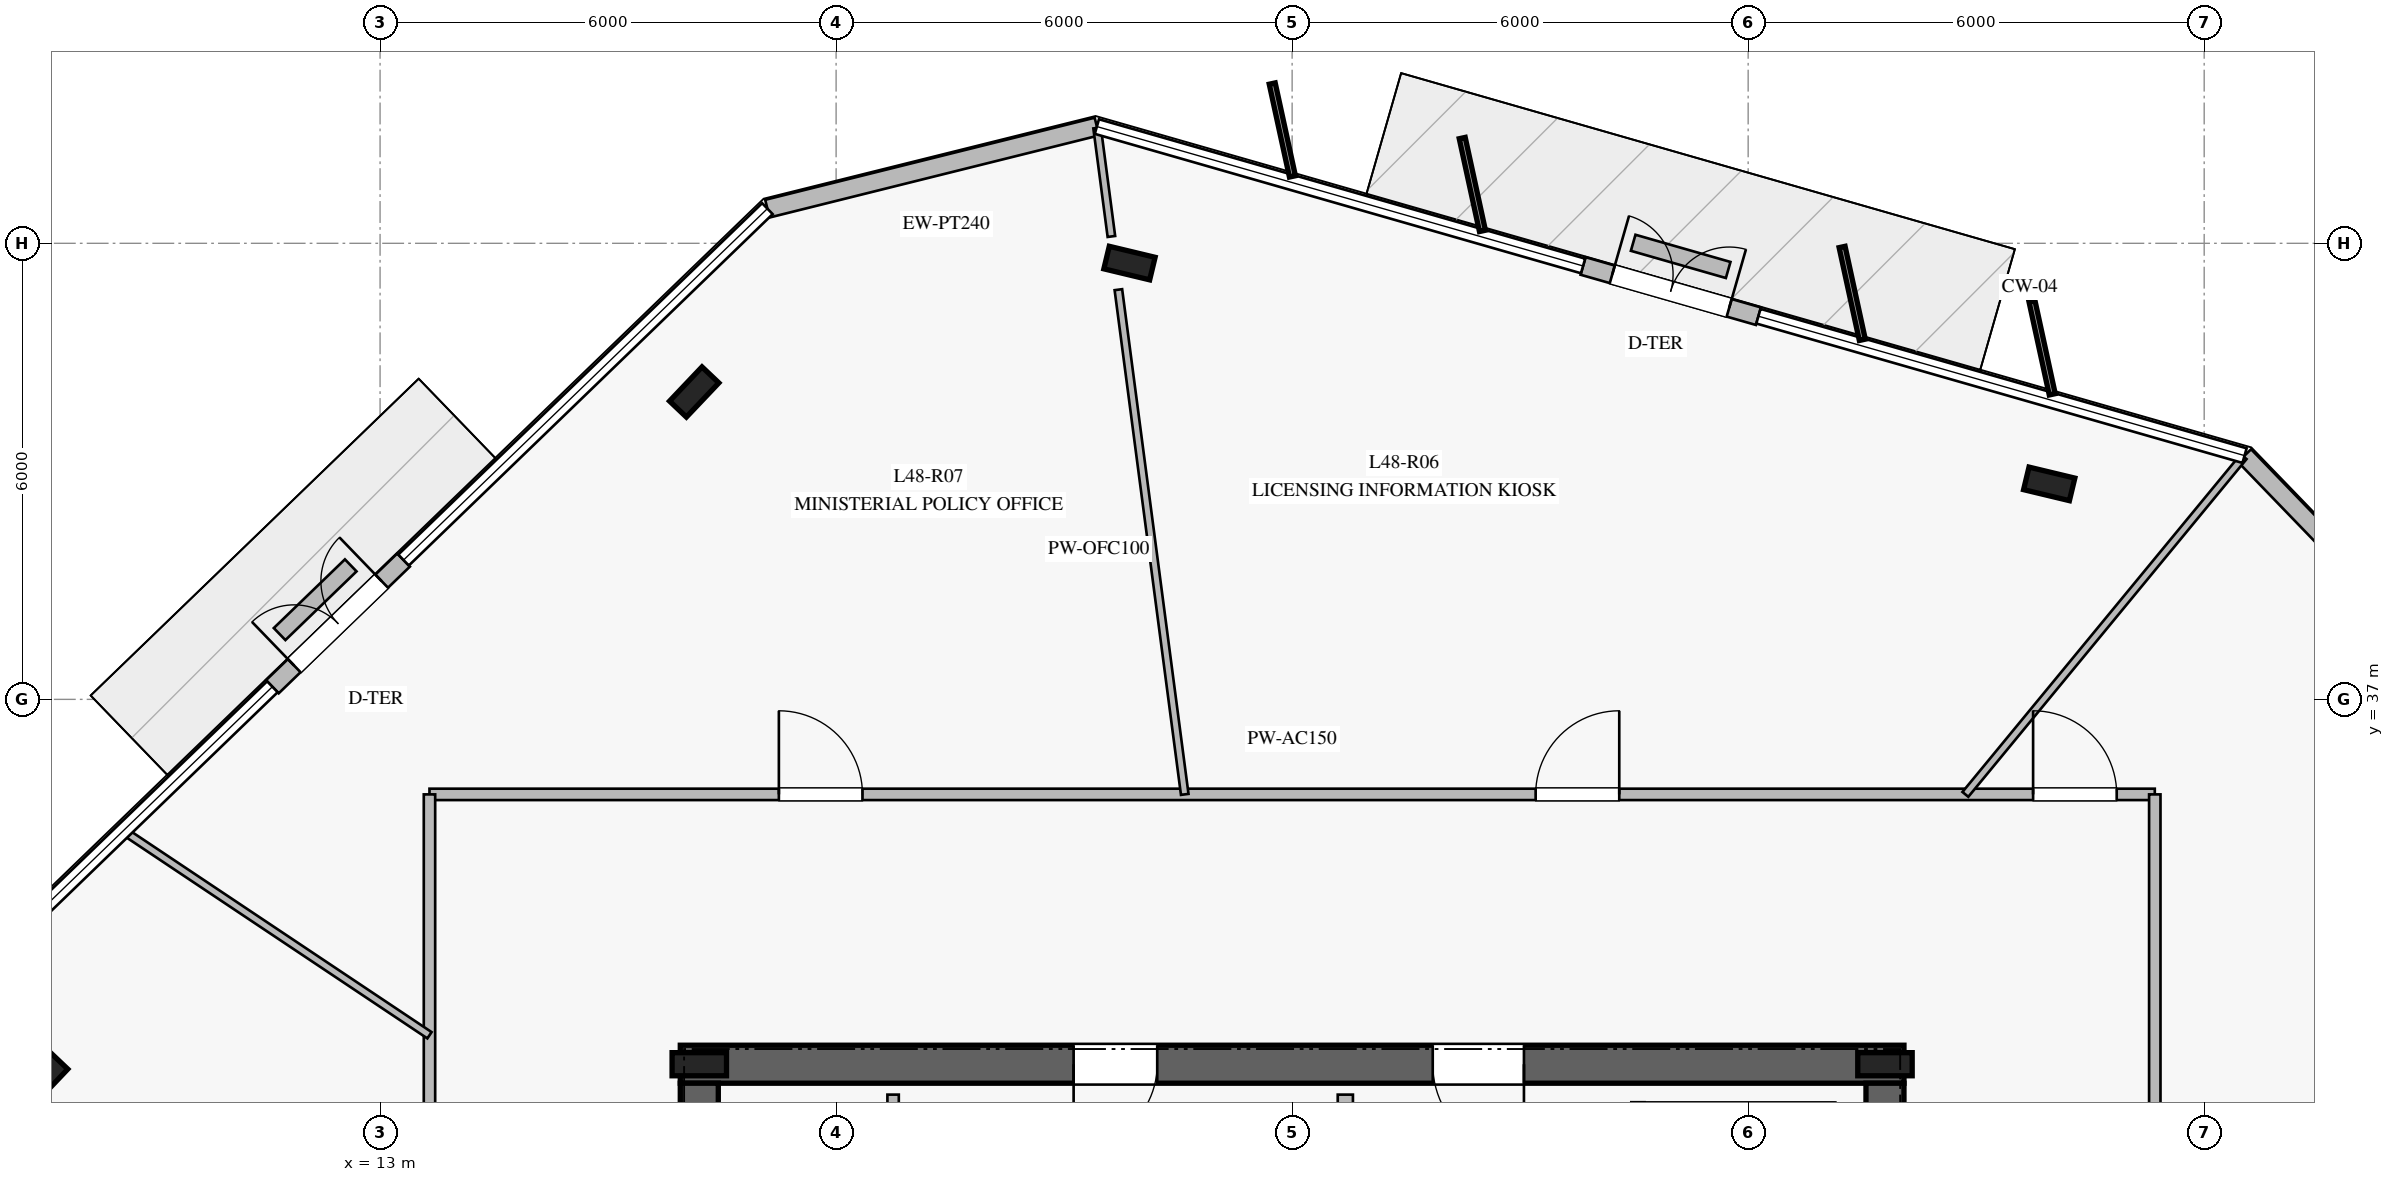
"""IFC4 building model, lengths in metres.
Left out: names, types, materials, properties, quantities, classifications, styles, units other than length and angle.
Written with IfcOpenShell. Run it as: python <this file> out.ifc"""

import sys

from ifc_helpers import new_model, si_unit, direction, frame, frame_2d, origin, origin_2d, place, context, subcontext, project, spatial, rectangle, i_section, extrude, element, fill, save


model = new_model("IFC4")
c1 = context("Model", 3, precision=1e-05, world=origin(), true_north=direction((0.0, 1.0)))
c2 = subcontext(c1, "Body", "Model", "MODEL_VIEW")
j1 = project(units=[si_unit("LENGTHUNIT", "METRE"), si_unit("PLANEANGLEUNIT", "RADIAN")], contexts=[c1])
p1 = place(None, origin())
s1 = spatial("IfcSite", under=j1, at=p1, CompositionType="ELEMENT")
p2 = place(p1, origin())
s2 = spatial("IfcBuilding", under=s1, at=p2, CompositionType="ELEMENT")
p3 = place(p2, frame((0.0, 0.0, 200.8)))
s3 = spatial("IfcBuildingStorey", under=s2, at=p3, CompositionType="ELEMENT", Elevation=200.8)
p4 = place(p3, frame((33.05, 32.2, 0.0), z_axis=(0.0, 0.0, 1.0), x_axis=(-1.0, 0.0, 0.0)))
e1 = element("IfcWall", 1, at=p4, inside=s3, PredefinedType="SHEAR", context=c2, shape_type="SweptSolid", body=[
    extrude(rectangle(XDim=16.1, YDim=0.5, at=frame_2d((8.05, 0.0))), origin(), (0.0, 0.0, 1.0), 3.78),
])
p5 = place(p4, frame((5.0, 0.0, 0.0)))
e2 = element("IfcOpeningElement", 2, at=p5, cuts=e1, PredefinedType="OPENING", context=c2, shape_type="SweptSolid", body=[
    extrude(rectangle(XDim=1.2, YDim=2.25, at=frame_2d((0.6, 1.125))), frame((0.0, 0.26, 0.0), z_axis=(0.0, -1.0, 0.0), x_axis=(1.0, 0.0, 0.0)), (0.0, 0.0, 1.0), 0.52),
])
p6 = place(p4, frame((9.825, 0.0, 0.0)))
e3 = element("IfcOpeningElement", 3, at=p6, cuts=e1, PredefinedType="OPENING", context=c2, shape_type="SweptSolid", body=[
    extrude(rectangle(XDim=1.1, YDim=2.2, at=frame_2d((0.55, 1.1))), frame((0.0, 0.26, 0.0), z_axis=(0.0, -1.0, 0.0), x_axis=(1.0, 0.0, 0.0)), (0.0, 0.0, 1.0), 0.52),
])
p7 = place(p3, frame((17.2, 31.95, 0.0), z_axis=(0.0, 0.0, 1.0), x_axis=(0.0, -1.0, 0.0)))
e4 = element("IfcWall", 4, at=p7, inside=s3, PredefinedType="SHEAR", context=c2, shape_type="SweptSolid", body=[
    extrude(rectangle(XDim=13.9, YDim=0.5, at=frame_2d((6.95, 0.0))), origin(), (0.0, 0.0, 1.0), 3.78),
])
p8 = place(p7, frame((2.1, 0.0, 0.0)))
e5 = element("IfcOpeningElement", 5, at=p8, cuts=e4, PredefinedType="OPENING", context=c2, shape_type="SweptSolid", body=[
    extrude(rectangle(XDim=1.5, YDim=2.2, at=frame_2d((0.75, 1.1))), frame((0.0, 0.26, 0.0), z_axis=(0.0, -1.0, 0.0), x_axis=(1.0, 0.0, 0.0)), (0.0, 0.0, 1.0), 0.52),
])
p9 = place(p3, frame((32.8, 18.05, 0.0), z_axis=(0.0, 0.0, 1.0), x_axis=(0.0, 1.0, 0.0)))
e6 = element("IfcWall", 6, at=p9, inside=s3, PredefinedType="SHEAR", context=c2, shape_type="SweptSolid", body=[
    extrude(rectangle(XDim=13.9, YDim=0.5, at=frame_2d((6.95, 0.0))), origin(), (0.0, 0.0, 1.0), 3.78),
])
for number, where, z_axis, x_axis in (
    (7, (32.8, 32.2, 0.0), (0.0, 0.0, 1.0), (1.0, 0.0, 0.0)),
    (8, (17.2, 32.2, 0.0), (0.0, 0.0, 1.0), (1.0, 0.0, 0.0)),
):
    element("IfcColumn", number, at=place(p3, frame(where, z_axis=z_axis, x_axis=x_axis)), inside=s3, PredefinedType="COLUMN", context=c2, shape_type="SweptSolid", body=[
        extrude(i_section(OverallWidth=0.304, OverallDepth=0.716, WebThickness=0.021, FlangeThickness=0.04, at=origin_2d()), origin(), (0.0, 0.0, 1.0), 4.0),
    ])
for number, where, z_axis, x_axis in (
    (9, (34.961, 39.835, 0.0), (0.0, 0.0, 1.0), (-0.972, 0.233, 0.0)),
    (10, (22.86, 42.74, 0.0), (0.0, 0.0, 1.0), (-0.972, 0.233, 0.0)),
    (11, (17.133, 41.044, 0.0), (0.0, 0.0, 1.0), (0.688, 0.725, 0.0)),
    (12, (8.567, 32.016, 0.0), (0.0, 0.0, 1.0), (0.688, 0.725, 0.0)),
):
    element("IfcColumn", number, at=place(p3, frame(where, z_axis=z_axis, x_axis=x_axis)), inside=s3, PredefinedType="COLUMN", context=c2, shape_type="SweptSolid", body=[
        extrude(i_section(OverallWidth=0.305, OverallDepth=0.62, WebThickness=0.021, FlangeThickness=0.04, at=origin_2d()), origin(), (0.0, 0.0, 1.0), 4.0),
    ])
p10 = place(p3, frame((31.135, 42.041, 0.0), z_axis=(0.0, 0.0, 1.0), x_axis=(-0.961335620244, 0.275379420529, 0.0)))
e13 = element("IfcWall", 13, at=p10, inside=s3, PredefinedType="STANDARD", context=c2, shape_type="SweptSolid", body=[
    extrude(rectangle(XDim=2.4, YDim=0.24, at=frame_2d((1.2, 0.0))), origin(), (0.0, 0.0, 1.0), 3.78),
])
p11 = place(p10, frame((0.4, 0.0, 0.0)))
e14 = element("IfcOpeningElement", 14, at=p11, cuts=e13, PredefinedType="OPENING", context=c2, shape_type="SweptSolid", body=[
    extrude(rectangle(XDim=1.6, YDim=2.25, at=frame_2d((0.8, 1.125))), frame((0.0, 0.13, 0.0), z_axis=(0.0, -1.0, 0.0), x_axis=(1.0, 0.0, 0.0)), (0.0, 0.0, 1.0), 0.26),
])
p12 = place(p3, frame((22.431, 44.536, 0.0), z_axis=(0.0, 0.0, 1.0), x_axis=(-0.970347888564, -0.241712587921, 0.0)))
e15 = element("IfcWall", 15, at=p12, inside=s3, PredefinedType="STANDARD", context=c2, shape_type="SweptSolid", body=[
    extrude(rectangle(XDim=4.468, YDim=0.24, at=frame_2d((2.234, 0.0))), origin(), (0.0, 0.0, 1.0), 3.78),
])
p13 = place(p3, frame((13.309, 38.833, 0.0), z_axis=(0.0, 0.0, 1.0), x_axis=(-0.719310294305, -0.694688923552, 0.0)))
e16 = element("IfcWall", 16, at=p13, inside=s3, PredefinedType="STANDARD", context=c2, shape_type="SweptSolid", body=[
    extrude(rectangle(XDim=2.4, YDim=0.24, at=frame_2d((1.2, 0.0))), origin(), (0.0, 0.0, 1.0), 3.78),
])
p14 = place(p13, frame((0.4, 0.0, 0.0)))
e17 = element("IfcOpeningElement", 17, at=p14, cuts=e16, PredefinedType="OPENING", context=c2, shape_type="SweptSolid", body=[
    extrude(rectangle(XDim=1.6, YDim=2.25, at=frame_2d((0.8, 1.125))), frame((0.0, 0.13, 0.0), z_axis=(0.0, -1.0, 0.0), x_axis=(1.0, 0.0, 0.0)), (0.0, 0.0, 1.0), 0.26),
])
p15 = place(p3, frame((40.635, 36.993, 0.0), z_axis=(0.0, 0.0, 1.0), x_axis=(-0.69467836701, 0.719320489357, 0.0)))
e18 = element("IfcWall", 18, at=p15, inside=s3, PredefinedType="STANDARD", context=c2, shape_type="SweptSolid", body=[
    extrude(rectangle(XDim=4.468, YDim=0.24, at=frame_2d((2.234, 0.0))), origin(), (0.0, 0.0, 1.0), 3.78),
])
p16 = place(p3, frame((12.614, 38.763, 0.0), z_axis=(0.0, 0.0, 1.0), x_axis=(-0.719288309138, -0.694711687204, 0.0)))
e19 = element("IfcWall", 19, at=p16, inside=s3, PredefinedType="USERDEFINED", context=c2, shape_type="SweptSolid", body=[
    extrude(rectangle(XDim=1.301, YDim=0.22, at=frame_2d((0.651, 0.0))), origin(), (0.0, 0.0, 1.0), 0.4),
])
p17 = place(p3, frame((30.737, 42.649, 0.0), z_axis=(0.0, 0.0, 1.0), x_axis=(-0.961318208277, 0.275440197567, 0.0)))
e20 = element("IfcWall", 20, at=p17, inside=s3, PredefinedType="USERDEFINED", context=c2, shape_type="SweptSolid", body=[
    extrude(rectangle(XDim=1.3, YDim=0.22, at=frame_2d((0.65, 0.0))), origin(), (0.0, 0.0, 1.0), 0.4),
])
p18 = place(p3, frame((25.7, 26.65, 0.0), z_axis=(0.0, 0.0, 1.0), x_axis=(0.0, 1.0, 0.0)))
e21 = element("IfcWall", 21, at=p18, inside=s3, PredefinedType="PARTITIONING", context=c2, shape_type="SweptSolid", body=[
    extrude(rectangle(XDim=5.15, YDim=0.2, at=frame_2d((2.575, 0.0))), origin(), (0.0, 0.0, 1.0), 3.78),
])
p19 = place(p3, frame((19.75, 29.39, 0.0), z_axis=(0.0, 0.0, 1.0), x_axis=(0.0, 1.0, 0.0)))
e22 = element("IfcWall", 22, at=p19, inside=s3, PredefinedType="PARTITIONING", context=c2, shape_type="SweptSolid", body=[
    extrude(rectangle(XDim=2.41, YDim=0.15, at=frame_2d((1.205, 0.0))), origin(), (0.0, 0.0, 1.0), 3.78),
])
p20 = place(p3, frame((13.65, 35.75, 0.0), z_axis=(0.0, 0.0, 1.0), x_axis=(1.0, 0.0, 0.0)))
e23 = element("IfcWall", 23, at=p20, inside=s3, PredefinedType="PARTITIONING", context=c2, shape_type="SweptSolid", body=[
    extrude(rectangle(XDim=22.7, YDim=0.15, at=frame_2d((11.35, 0.0))), origin(), (0.0, 0.0, 1.0), 3.28),
])
p21 = place(p20, frame((21.099, 0.0, 0.0)))
e24 = element("IfcOpeningElement", 24, at=p21, cuts=e23, PredefinedType="OPENING", context=c2, shape_type="SweptSolid", body=[
    extrude(rectangle(XDim=1.1, YDim=2.2, at=frame_2d((0.55, 1.1))), frame((0.0, 0.085, 0.0), z_axis=(0.0, -1.0, 0.0), x_axis=(1.0, 0.0, 0.0)), (0.0, 0.0, 1.0), 0.17),
])
p22 = place(p20, frame((14.554, 0.0, 0.0)))
e25 = element("IfcOpeningElement", 25, at=p22, cuts=e23, PredefinedType="OPENING", context=c2, shape_type="SweptSolid", body=[
    extrude(rectangle(XDim=1.1, YDim=2.2, at=frame_2d((0.55, 1.1))), frame((0.0, 0.085, 0.0), z_axis=(0.0, -1.0, 0.0), x_axis=(1.0, 0.0, 0.0)), (0.0, 0.0, 1.0), 0.17),
])
p23 = place(p20, frame((4.597, 0.0, 0.0)))
e26 = element("IfcOpeningElement", 26, at=p23, cuts=e23, PredefinedType="OPENING", context=c2, shape_type="SweptSolid", body=[
    extrude(rectangle(XDim=1.1, YDim=2.2, at=frame_2d((0.55, 1.1))), frame((0.0, 0.085, 0.0), z_axis=(0.0, -1.0, 0.0), x_axis=(1.0, 0.0, 0.0)), (0.0, 0.0, 1.0), 0.17),
])
p24 = place(p3, frame((36.35, 35.75, 0.0), z_axis=(0.0, 0.0, 1.0), x_axis=(0.0, -1.0, 0.0)))
e27 = element("IfcWall", 27, at=p24, inside=s3, PredefinedType="PARTITIONING", context=c2, shape_type="SweptSolid", body=[
    extrude(rectangle(XDim=21.5, YDim=0.15, at=frame_2d((10.75, 0.0))), origin(), (0.0, 0.0, 1.0), 3.05),
])
p25 = place(p24, frame((13.969, 0.0, 0.0)))
e28 = element("IfcOpeningElement", 28, at=p25, cuts=e27, PredefinedType="OPENING", context=c2, shape_type="SweptSolid", body=[
    extrude(rectangle(XDim=1.1, YDim=2.2, at=frame_2d((0.55, 1.1))), frame((0.0, 0.085, 0.0), z_axis=(0.0, -1.0, 0.0), x_axis=(1.0, 0.0, 0.0)), (0.0, 0.0, 1.0), 0.17),
])
p26 = place(p3, frame((13.65, 14.25, 0.0), z_axis=(0.0, 0.0, 1.0), x_axis=(0.0, 1.0, 0.0)))
e29 = element("IfcWall", 29, at=p26, inside=s3, PredefinedType="PARTITIONING", context=c2, shape_type="SweptSolid", body=[
    extrude(rectangle(XDim=21.5, YDim=0.15, at=frame_2d((10.75, 0.0))), origin(), (0.0, 0.0, 1.0), 3.05),
])
p27 = place(p26, frame((11.591, 0.0, 0.0)))
e30 = element("IfcOpeningElement", 30, at=p27, cuts=e29, PredefinedType="OPENING", context=c2, shape_type="SweptSolid", body=[
    extrude(rectangle(XDim=1.1, YDim=2.2, at=frame_2d((0.55, 1.1))), frame((0.0, 0.085, 0.0), z_axis=(0.0, -1.0, 0.0), x_axis=(1.0, 0.0, 0.0)), (0.0, 0.0, 1.0), 0.17),
])
p28 = place(p3, frame((23.587, 35.75, 0.0), z_axis=(0.0, 0.0, 1.0), x_axis=(-0.130327203817, 0.991471038379, 0.0)))
e31 = element("IfcWall", 31, at=p28, inside=s3, PredefinedType="MOVABLE", context=c2, shape_type="SweptSolid", body=[
    extrude(rectangle(XDim=6.697, YDim=0.1, at=frame_2d((3.349, 0.0))), origin(), (0.0, 0.0, 1.0), 3.18),
])
p29 = place(p3, frame((22.622, 43.09, 0.0), z_axis=(0.0, 0.0, 1.0), x_axis=(-0.130520284178, 0.991445639164, 0.0)))
e32 = element("IfcWall", 32, at=p29, inside=s3, PredefinedType="MOVABLE", context=c2, shape_type="SweptSolid", body=[
    extrude(rectangle(XDim=1.44, YDim=0.1, at=frame_2d((0.72, 0.0))), origin(), (0.0, 0.0, 1.0), 3.78),
])
p30 = place(p3, frame((13.65, 32.581, 0.0), z_axis=(0.0, 0.0, 1.0), x_axis=(-0.831637717468, 0.555318563425, 0.0)))
e33 = element("IfcWall", 33, at=p30, inside=s3, PredefinedType="MOVABLE", context=c2, shape_type="SweptSolid", body=[
    extrude(rectangle(XDim=4.828, YDim=0.1, at=frame_2d((2.414, 0.0))), origin(), (0.0, 0.0, 1.0), 3.18),
])
p31 = place(p3, frame((33.858, 35.75, 0.0), z_axis=(0.0, 0.0, 1.0), x_axis=(0.635924242857, 0.77175148678, 0.0)))
e34 = element("IfcWall", 34, at=p31, inside=s3, PredefinedType="MOVABLE", context=c2, shape_type="SweptSolid", body=[
    extrude(rectangle(XDim=5.757, YDim=0.1, at=frame_2d((2.878, 0.0))), origin(), (0.0, 0.0, 1.0), 3.18),
])
p32 = place(p11, frame((1.6, 0.0, 0.0), z_axis=(0.0, 0.0, 1.0), x_axis=(-1.0, 0.0, 0.0)))
e35 = element("IfcDoor", 35, at=p32, inside=s3, OperationType="DOUBLE_DOOR_SINGLE_SWING", PredefinedType="DOOR", context=c2, shape_type="SweptSolid", body=[
    extrude(rectangle(XDim=1.6, YDim=2.25, at=frame_2d((0.8, 1.125))), frame((0.0, 0.025, 0.0), z_axis=(0.0, -1.0, 0.0), x_axis=(1.0, 0.0, 0.0)), (0.0, 0.0, 1.0), 0.05),
])
fill(e14, e35)
p33 = place(p14, frame((1.6, 0.0, 0.0), z_axis=(0.0, 0.0, 1.0), x_axis=(-1.0, 0.0, 0.0)))
e36 = element("IfcDoor", 36, at=p33, inside=s3, OperationType="DOUBLE_DOOR_SINGLE_SWING", PredefinedType="DOOR", context=c2, shape_type="SweptSolid", body=[
    extrude(rectangle(XDim=1.6, YDim=2.25, at=frame_2d((0.8, 1.125))), frame((0.0, 0.025, 0.0), z_axis=(0.0, -1.0, 0.0), x_axis=(1.0, 0.0, 0.0)), (0.0, 0.0, 1.0), 0.05),
])
fill(e17, e36)
p34 = place(p5, origin())
e37 = element("IfcDoor", 37, at=p34, inside=s3, OperationType="SINGLE_SWING_LEFT", PredefinedType="DOOR", context=c2, shape_type="SweptSolid", body=[
    extrude(rectangle(XDim=1.2, YDim=2.25, at=frame_2d((0.6, 1.125))), frame((0.0, 0.025, 0.0), z_axis=(0.0, -1.0, 0.0), x_axis=(1.0, 0.0, 0.0)), (0.0, 0.0, 1.0), 0.05),
])
fill(e2, e37)
p35 = place(p6, origin())
e38 = element("IfcDoor", 38, at=p35, inside=s3, OperationType="SINGLE_SWING_RIGHT", PredefinedType="DOOR", context=c2, shape_type="SweptSolid", body=[
    extrude(rectangle(XDim=1.1, YDim=2.2, at=frame_2d((0.55, 1.1))), frame((0.0, 0.025, 0.0), z_axis=(0.0, -1.0, 0.0), x_axis=(1.0, 0.0, 0.0)), (0.0, 0.0, 1.0), 0.05),
])
fill(e3, e38)
p36 = place(p21, origin())
e39 = element("IfcDoor", 39, at=p36, inside=s3, OperationType="SINGLE_SWING_LEFT", PredefinedType="DOOR", context=c2, shape_type="SweptSolid", body=[
    extrude(rectangle(XDim=1.1, YDim=2.2, at=frame_2d((0.55, 1.1))), frame((0.0, 0.025, 0.0), z_axis=(0.0, -1.0, 0.0), x_axis=(1.0, 0.0, 0.0)), (0.0, 0.0, 1.0), 0.05),
])
fill(e24, e39)
p37 = place(p22, origin())
e40 = element("IfcDoor", 40, at=p37, inside=s3, OperationType="SINGLE_SWING_RIGHT", PredefinedType="DOOR", context=c2, shape_type="SweptSolid", body=[
    extrude(rectangle(XDim=1.1, YDim=2.2, at=frame_2d((0.55, 1.1))), frame((0.0, 0.025, 0.0), z_axis=(0.0, -1.0, 0.0), x_axis=(1.0, 0.0, 0.0)), (0.0, 0.0, 1.0), 0.05),
])
fill(e25, e40)
p38 = place(p23, origin())
e41 = element("IfcDoor", 41, at=p38, inside=s3, OperationType="SINGLE_SWING_LEFT", PredefinedType="DOOR", context=c2, shape_type="SweptSolid", body=[
    extrude(rectangle(XDim=1.1, YDim=2.2, at=frame_2d((0.55, 1.1))), frame((0.0, 0.025, 0.0), z_axis=(0.0, -1.0, 0.0), x_axis=(1.0, 0.0, 0.0)), (0.0, 0.0, 1.0), 0.05),
])
fill(e26, e41)
save(model, sys.argv[1])
